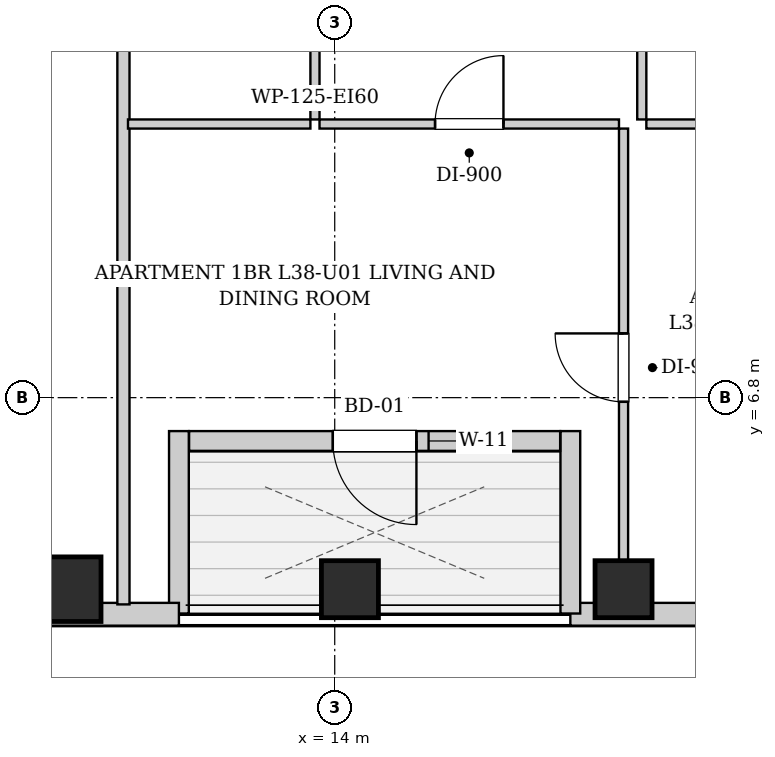
"""IFC4 building model, lengths in metres.
Left out: names, types, materials, properties, quantities, classifications, styles, units other than length and angle.
Written with IfcOpenShell. Run it as: python <this file> out.ifc"""

import sys

from ifc_helpers import new_model, si_unit, direction, frame, frame_2d, origin, origin_2d, place, context, subcontext, project, spatial, rectangle, extrude, element, fill, save


model = new_model("IFC4")
c1 = context("Model", 3, precision=1e-05, world=origin(), true_north=direction((0.0, 1.0)))
c2 = subcontext(c1, "Body", "Model", "MODEL_VIEW")
j1 = project(units=[si_unit("LENGTHUNIT", "METRE"), si_unit("PLANEANGLEUNIT", "RADIAN")], contexts=[c1])
p1 = place(None, origin())
s1 = spatial("IfcSite", under=j1, at=p1, CompositionType="ELEMENT")
p2 = place(p1, origin())
s2 = spatial("IfcBuilding", under=s1, at=p2, CompositionType="ELEMENT")
p3 = place(p2, frame((0.0, 0.0, 134.15)))
s3 = spatial("IfcBuildingStorey", under=s2, at=p3, CompositionType="ELEMENT", Elevation=134.15)
p4 = place(p3, frame((10.5, 4.28, 0.0), z_axis=(0.0, 0.0, 1.0), x_axis=(1.0, 0.0, 0.0)))
e1 = element("IfcColumn", 1, at=p4, inside=s3, PredefinedType="COLUMN", context=c2, shape_type="SweptSolid", body=[
    extrude(rectangle(XDim=0.85, YDim=0.85, at=origin_2d()), origin(), (0.0, 0.0, 1.0), 3.25),
])
for number, where, z_axis, x_axis in (
    (2, (14.2, 4.28, 0.0), (0.0, 0.0, 1.0), (1.0, 0.0, 0.0)),
    (3, (17.8, 4.28, 0.0), (0.0, 0.0, 1.0), (1.0, 0.0, 0.0)),
):
    element("IfcColumn", number, at=place(p3, frame(where, z_axis=z_axis, x_axis=x_axis)), inside=s3, PredefinedType="COLUMN", context=c2, shape_type="SweptSolid", body=[
        extrude(rectangle(XDim=0.75, YDim=0.75, at=origin_2d()), origin(), (0.0, 0.0, 1.0), 3.25),
    ])
p5 = place(p3, frame((37.8, 3.95, 0.0), z_axis=(0.0, 0.0, 1.0), x_axis=(-1.0, 0.0, 0.0)))
e4 = element("IfcWall", 4, at=p5, inside=s3, PredefinedType="SOLIDWALL", context=c2, shape_type="SweptSolid", body=[
    extrude(rectangle(XDim=20.7, YDim=0.3, at=frame_2d((10.35, 0.0))), origin(), (0.0, 0.0, 1.0), 2.99),
])
p6 = place(p5, frame((17.305, 0.0, 0.55)))
e5 = element("IfcOpeningElement", 5, at=p6, cuts=e4, PredefinedType="OPENING", context=c2, shape_type="SweptSolid", body=[
    extrude(rectangle(XDim=1.35, YDim=1.2, at=frame_2d((0.675, 0.6))), frame((0.0, 0.16, 0.0), z_axis=(0.0, -1.0, 0.0), x_axis=(1.0, 0.0, 0.0)), (0.0, 0.0, 1.0), 0.32),
])
p7 = place(p5, frame((7.106, 0.0, 0.55)))
e6 = element("IfcOpeningElement", 6, at=p7, cuts=e4, PredefinedType="OPENING", context=c2, shape_type="SweptSolid", body=[
    extrude(rectangle(XDim=1.35, YDim=1.2, at=frame_2d((0.675, 0.6))), frame((0.0, 0.16, 0.0), z_axis=(0.0, -1.0, 0.0), x_axis=(1.0, 0.0, 0.0)), (0.0, 0.0, 1.0), 0.32),
])
p8 = place(p5, frame((2.715, 0.0, 0.55)))
e7 = element("IfcOpeningElement", 7, at=p8, cuts=e4, PredefinedType="OPENING", context=c2, shape_type="SweptSolid", body=[
    extrude(rectangle(XDim=1.35, YDim=1.2, at=frame_2d((0.675, 0.6))), frame((0.0, 0.16, 0.0), z_axis=(0.0, -1.0, 0.0), x_axis=(1.0, 0.0, 0.0)), (0.0, 0.0, 1.0), 0.32),
])
p9 = place(p3, frame((17.1, 3.96, 0.0), z_axis=(0.0, 0.0, 1.0), x_axis=(0.0, 1.0, 0.0)))
e8 = element("IfcWall", 8, at=p9, inside=s3, PredefinedType="SOLIDWALL", context=c2, shape_type="SweptSolid", body=[
    extrude(rectangle(XDim=2.4, YDim=0.26, at=frame_2d((1.2, 0.0))), origin(), (0.0, 0.0, 1.0), 2.99),
])
p10 = place(p3, frame((16.966, 6.23, 0.0), z_axis=(0.0, 0.0, 1.0), x_axis=(-1.0, 0.0, 0.0)))
e9 = element("IfcWall", 9, at=p10, inside=s3, PredefinedType="SOLIDWALL", context=c2, shape_type="SweptSolid", body=[
    extrude(rectangle(XDim=4.882, YDim=0.26, at=frame_2d((2.441, 0.0))), origin(), (0.0, 0.0, 1.0), 2.99),
])
p11 = place(p10, frame((1.891, 0.0, 0.0)))
e10 = element("IfcOpeningElement", 10, at=p11, cuts=e9, PredefinedType="OPENING", context=c2, shape_type="SweptSolid", body=[
    extrude(rectangle(XDim=1.1, YDim=2.0, at=frame_2d((0.55, 1.0))), frame((0.0, 0.14, 0.0), z_axis=(0.0, -1.0, 0.0), x_axis=(1.0, 0.0, 0.0)), (0.0, 0.0, 1.0), 0.28),
])
p12 = place(p10, frame((0.881, 0.0, 0.55)))
e11 = element("IfcOpeningElement", 11, at=p12, cuts=e9, PredefinedType="OPENING", context=c2, shape_type="SweptSolid", body=[
    extrude(rectangle(XDim=0.85, YDim=1.2, at=frame_2d((0.425, 0.6))), frame((0.0, 0.14, 0.0), z_axis=(0.0, -1.0, 0.0), x_axis=(1.0, 0.0, 0.0)), (0.0, 0.0, 1.0), 0.28),
])
p13 = place(p3, frame((11.95, 6.36, 0.0), z_axis=(0.0, 0.0, 1.0), x_axis=(0.0, -1.0, 0.0)))
e12 = element("IfcWall", 12, at=p13, inside=s3, PredefinedType="SOLIDWALL", context=c2, shape_type="SweptSolid", body=[
    extrude(rectangle(XDim=2.4, YDim=0.26, at=frame_2d((1.2, 0.0))), origin(), (0.0, 0.0, 1.0), 2.99),
])
p14 = place(p3, frame((11.95, 3.95, 0.0), z_axis=(0.0, 0.0, 1.0), x_axis=(-1.0, 0.0, 0.0)))
e13 = element("IfcWall", 13, at=p14, inside=s3, PredefinedType="SOLIDWALL", context=c2, shape_type="SweptSolid", body=[
    extrude(rectangle(XDim=1.95, YDim=0.3, at=frame_2d((0.975, 0.0))), origin(), (0.0, 0.0, 1.0), 2.99),
])
p15 = place(p3, frame((11.22, 4.08, 0.0), z_axis=(0.0, 0.0, 1.0), x_axis=(0.0, 1.0, 0.0)))
e14 = element("IfcWall", 14, at=p15, inside=s3, PredefinedType="PARTITIONING", context=c2, shape_type="SweptSolid", body=[
    extrude(rectangle(XDim=9.23, YDim=0.16, at=frame_2d((4.615, 0.0))), origin(), (0.0, 0.0, 1.0), 2.99),
])
p16 = place(p3, frame((13.74, 10.46, 0.0), z_axis=(0.0, 0.0, 1.0), x_axis=(0.0, 1.0, 0.0)))
e15 = element("IfcWall", 15, at=p16, inside=s3, PredefinedType="PARTITIONING", context=c2, shape_type="SweptSolid", body=[
    extrude(rectangle(XDim=2.85, YDim=0.12, at=frame_2d((1.425, 0.0))), origin(), (0.0, 0.0, 1.0), 2.99),
])
p17 = place(p16, frame((0.995, 0.0, 0.0)))
e16 = element("IfcOpeningElement", 16, at=p17, cuts=e15, PredefinedType="OPENING", context=c2, shape_type="SweptSolid", body=[
    extrude(rectangle(XDim=0.86, YDim=2.05, at=frame_2d((0.43, 1.025))), frame((0.0, 0.07, 0.0), z_axis=(0.0, -1.0, 0.0), x_axis=(1.0, 0.0, 0.0)), (0.0, 0.0, 1.0), 0.14),
])
p18 = place(p3, frame((11.28, 10.4, 0.0), z_axis=(0.0, 0.0, 1.0), x_axis=(1.0, 0.0, 0.0)))
e17 = element("IfcWall", 17, at=p18, inside=s3, PredefinedType="PARTITIONING", context=c2, shape_type="SweptSolid", body=[
    extrude(rectangle(XDim=2.4, YDim=0.12, at=frame_2d((1.2, 0.0))), origin(), (0.0, 0.0, 1.0), 2.99),
])
p19 = place(p3, frame((18.04, 10.46, 0.0), z_axis=(0.0, 0.0, 1.0), x_axis=(0.0, 1.0, 0.0)))
e18 = element("IfcWall", 18, at=p19, inside=s3, PredefinedType="PARTITIONING", context=c2, shape_type="SweptSolid", body=[
    extrude(rectangle(XDim=2.85, YDim=0.12, at=frame_2d((1.425, 0.0))), origin(), (0.0, 0.0, 1.0), 2.99),
])
p20 = place(p19, frame((0.975, 0.0, 0.0)))
e19 = element("IfcOpeningElement", 19, at=p20, cuts=e18, PredefinedType="OPENING", context=c2, shape_type="SweptSolid", body=[
    extrude(rectangle(XDim=0.9, YDim=2.05, at=frame_2d((0.45, 1.025))), frame((0.0, 0.07, 0.0), z_axis=(0.0, -1.0, 0.0), x_axis=(1.0, 0.0, 0.0)), (0.0, 0.0, 1.0), 0.14),
])
p21 = place(p3, frame((13.8, 10.4, 0.0), z_axis=(0.0, 0.0, 1.0), x_axis=(1.0, 0.0, 0.0)))
e20 = element("IfcWall", 20, at=p21, inside=s3, PredefinedType="PARTITIONING", context=c2, shape_type="SweptSolid", body=[
    extrude(rectangle(XDim=3.94, YDim=0.12, at=frame_2d((1.97, 0.0))), origin(), (0.0, 0.0, 1.0), 2.99),
])
p22 = place(p21, frame((1.52, 0.0, 0.0)))
e21 = element("IfcOpeningElement", 21, at=p22, cuts=e20, PredefinedType="OPENING", context=c2, shape_type="SweptSolid", body=[
    extrude(rectangle(XDim=0.9, YDim=2.05, at=frame_2d((0.45, 1.025))), frame((0.0, 0.07, 0.0), z_axis=(0.0, -1.0, 0.0), x_axis=(1.0, 0.0, 0.0)), (0.0, 0.0, 1.0), 0.14),
])
p23 = place(p3, frame((18.1, 10.4, 0.0), z_axis=(0.0, 0.0, 1.0), x_axis=(1.0, 0.0, 0.0)))
e22 = element("IfcWall", 22, at=p23, inside=s3, PredefinedType="PARTITIONING", context=c2, shape_type="SweptSolid", body=[
    extrude(rectangle(XDim=3.708, YDim=0.12, at=frame_2d((1.854, 0.0))), origin(), (0.0, 0.0, 1.0), 2.99),
])
p24 = place(p23, frame((1.404, 0.0, 0.0)))
e23 = element("IfcOpeningElement", 23, at=p24, cuts=e22, PredefinedType="OPENING", context=c2, shape_type="SweptSolid", body=[
    extrude(rectangle(XDim=0.9, YDim=2.05, at=frame_2d((0.45, 1.025))), frame((0.0, 0.07, 0.0), z_axis=(0.0, -1.0, 0.0), x_axis=(1.0, 0.0, 0.0)), (0.0, 0.0, 1.0), 0.14),
])
p25 = place(p3, frame((17.8, 4.08, 0.0), z_axis=(0.0, 0.0, 1.0), x_axis=(0.0, 1.0, 0.0)))
e24 = element("IfcWall", 24, at=p25, inside=s3, PredefinedType="PARTITIONING", context=c2, shape_type="SweptSolid", body=[
    extrude(rectangle(XDim=6.26, YDim=0.12, at=frame_2d((3.13, 0.0))), origin(), (0.0, 0.0, 1.0), 2.426),
])
p26 = place(p25, frame((2.665, 0.0, 0.0)))
e25 = element("IfcOpeningElement", 25, at=p26, cuts=e24, PredefinedType="OPENING", context=c2, shape_type="SweptSolid", body=[
    extrude(rectangle(XDim=0.9, YDim=2.05, at=frame_2d((0.45, 1.025))), frame((0.0, 0.07, 0.0), z_axis=(0.0, -1.0, 0.0), x_axis=(1.0, 0.0, 0.0)), (0.0, 0.0, 1.0), 0.14),
])
p27 = place(p22, origin())
e26 = element("IfcDoor", 26, at=p27, inside=s3, OperationType="SINGLE_SWING_RIGHT", PredefinedType="DOOR", context=c2, shape_type="SweptSolid", body=[
    extrude(rectangle(XDim=0.9, YDim=2.05, at=frame_2d((0.45, 1.025))), frame((0.0, 0.025, 0.0), z_axis=(0.0, -1.0, 0.0), x_axis=(1.0, 0.0, 0.0)), (0.0, 0.0, 1.0), 0.05),
])
fill(e21, e26)
p28 = place(p26, origin())
e27 = element("IfcDoor", 27, at=p28, inside=s3, OperationType="SINGLE_SWING_RIGHT", PredefinedType="DOOR", context=c2, shape_type="SweptSolid", body=[
    extrude(rectangle(XDim=0.9, YDim=2.05, at=frame_2d((0.45, 1.025))), frame((0.0, 0.025, 0.0), z_axis=(0.0, -1.0, 0.0), x_axis=(1.0, 0.0, 0.0)), (0.0, 0.0, 1.0), 0.05),
])
fill(e25, e27)
p29 = place(p11, origin())
e28 = element("IfcDoor", 28, at=p29, inside=s3, OperationType="SINGLE_SWING_LEFT", PredefinedType="DOOR", context=c2, shape_type="SweptSolid", body=[
    extrude(rectangle(XDim=1.1, YDim=2.0, at=frame_2d((0.55, 1.0))), frame((0.0, 0.025, 0.0), z_axis=(0.0, -1.0, 0.0), x_axis=(1.0, 0.0, 0.0)), (0.0, 0.0, 1.0), 0.05),
])
fill(e10, e28)
p30 = place(p12, origin())
e29 = element("IfcWindow", 29, at=p30, inside=s3, PartitioningType="SINGLE_PANEL", PredefinedType="WINDOW", context=c2, shape_type="SweptSolid", body=[
    extrude(rectangle(XDim=0.85, YDim=1.2, at=frame_2d((0.425, 0.6))), frame((0.0, 0.03, 0.0), z_axis=(0.0, -1.0, 0.0), x_axis=(1.0, 0.0, 0.0)), (0.0, 0.0, 1.0), 0.06),
])
fill(e11, e29)
save(model, sys.argv[1])
